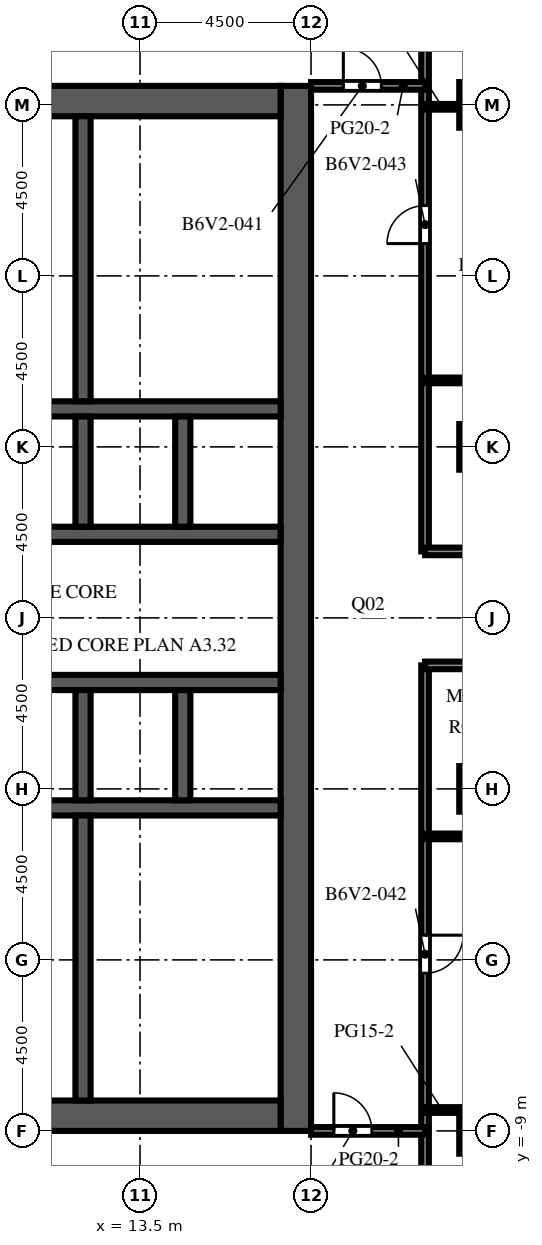
"""IFC4 building model, lengths in metres.
Left out: names, types, materials, properties, quantities, classifications, styles, units other than length and angle.
Written with IfcOpenShell. Run it as: python <this file> out.ifc"""

import sys

from ifc_helpers import new_model, si_unit, direction, frame, frame_2d, origin, origin_2d, place, context, subcontext, project, spatial, rectangle, extrude, element, fill, save


model = new_model("IFC4")
c1 = context("Model", 3, precision=1e-05, world=origin(), true_north=direction((0.0, 1.0)))
c2 = subcontext(c1, "Body", "Model", "MODEL_VIEW")
j1 = project(units=[si_unit("LENGTHUNIT", "METRE"), si_unit("PLANEANGLEUNIT", "RADIAN")], contexts=[c1])
p1 = place(None, origin())
s1 = spatial("IfcSite", under=j1, at=p1, CompositionType="ELEMENT")
p2 = place(p1, origin())
s2 = spatial("IfcBuilding", under=s1, at=p2, CompositionType="ELEMENT")
p3 = place(p2, frame((0.0, 0.0, 216.1)))
s3 = spatial("IfcBuildingStorey", under=s2, at=p3, CompositionType="ELEMENT", Elevation=216.1)
for number, where, z_axis, x_axis in (
    (1, (22.5, -9.0, 0.0), (0.0, 0.0, 1.0), (1.0, 0.0, 0.0)),
    (2, (22.5, 0.0, 0.0), (0.0, 0.0, 1.0), (1.0, 0.0, 0.0)),
    (3, (22.5, 9.0, 0.0), (0.0, 0.0, 1.0), (1.0, 0.0, 0.0)),
    (4, (22.5, 18.0, 0.0), (0.0, 0.0, 1.0), (1.0, 0.0, 0.0)),
):
    element("IfcColumn", number, at=place(p3, frame(where, z_axis=z_axis, x_axis=x_axis)), inside=s3, PredefinedType="COLUMN", context=c2, shape_type="SweptSolid", body=[
        extrude(rectangle(XDim=1.2, YDim=1.2, at=origin_2d()), origin(), (0.0, 0.0, 1.0), 4.1),
    ])
p4 = place(p3, frame((17.6, -9.0, 0.0), z_axis=(0.0, 0.0, 1.0), x_axis=(0.0, 1.0, 0.0)))
e5 = element("IfcWall", 5, at=p4, inside=s3, PredefinedType="SHEAR", context=c2, shape_type="SweptSolid", body=[
    extrude(rectangle(XDim=27.5, YDim=0.8, at=frame_2d((13.75, 0.0))), origin(), (0.0, 0.0, 1.0), 4.1),
])
p5 = place(p4, frame((12.55, 0.0, 0.0)))
e6 = element("IfcOpeningElement", 6, at=p5, cuts=e5, PredefinedType="OPENING", context=c2, shape_type="SweptSolid", body=[
    extrude(rectangle(XDim=2.4, YDim=2.4, at=frame_2d((1.2, 1.2))), frame((0.0, 0.41, 0.0), z_axis=(0.0, -1.0, 0.0), x_axis=(1.0, 0.0, 0.0)), (0.0, 0.0, 1.0), 0.82),
])
p6 = place(p4, frame((6.825, 0.0, 0.0)))
e7 = element("IfcOpeningElement", 7, at=p6, cuts=e5, PredefinedType="OPENING", context=c2, shape_type="SweptSolid", body=[
    extrude(rectangle(XDim=1.2, YDim=2.1, at=frame_2d((0.6, 1.05))), frame((0.0, 0.41, 0.0), z_axis=(0.0, -1.0, 0.0), x_axis=(1.0, 0.0, 0.0)), (0.0, 0.0, 1.0), 0.82),
])
p7 = place(p4, frame((19.475, 0.0, 0.0)))
e8 = element("IfcOpeningElement", 8, at=p7, cuts=e5, PredefinedType="OPENING", context=c2, shape_type="SweptSolid", body=[
    extrude(rectangle(XDim=1.2, YDim=2.1, at=frame_2d((0.6, 1.05))), frame((0.0, 0.41, 0.0), z_axis=(0.0, -1.0, 0.0), x_axis=(1.0, 0.0, 0.0)), (0.0, 0.0, 1.0), 0.82),
])
for number, where, z_axis, x_axis in (
    (9, (6.8, -8.6, 0.0), (0.0, 0.0, 1.0), (1.0, 0.0, 0.0)),
    (10, (6.8, 18.1, 0.0), (0.0, 0.0, 1.0), (1.0, 0.0, 0.0)),
):
    element("IfcWall", number, at=place(p3, frame(where, z_axis=z_axis, x_axis=x_axis)), inside=s3, PredefinedType="SHEAR", context=c2, shape_type="SweptSolid", body=[
        extrude(rectangle(XDim=10.4, YDim=0.8, at=frame_2d((5.2, 0.0))), origin(), (0.0, 0.0, 1.0), 4.1),
    ])
p8 = place(p3, frame((6.8, -0.5, 0.0), z_axis=(0.0, 0.0, 1.0), x_axis=(1.0, 0.0, 0.0)))
e11 = element("IfcWall", 11, at=p8, inside=s3, PredefinedType="SHEAR", context=c2, shape_type="SweptSolid", body=[
    extrude(rectangle(XDim=10.4, YDim=0.4, at=frame_2d((5.2, 0.0))), origin(), (0.0, 0.0, 1.0), 4.1),
])
p9 = place(p3, frame((6.8, 2.8, 0.0), z_axis=(0.0, 0.0, 1.0), x_axis=(1.0, 0.0, 0.0)))
e12 = element("IfcWall", 12, at=p9, inside=s3, PredefinedType="SHEAR", context=c2, shape_type="SweptSolid", body=[
    extrude(rectangle(XDim=10.4, YDim=0.4, at=frame_2d((5.2, 0.0))), origin(), (0.0, 0.0, 1.0), 4.1),
])
p10 = place(p9, frame((0.738, 0.0, 0.0)))
e13 = element("IfcOpeningElement", 13, at=p10, cuts=e12, PredefinedType="OPENING", context=c2, shape_type="SweptSolid", body=[
    extrude(rectangle(XDim=1.1, YDim=2.1, at=frame_2d((0.55, 1.05))), frame((0.0, 0.21, 0.0), z_axis=(0.0, -1.0, 0.0), x_axis=(1.0, 0.0, 0.0)), (0.0, 0.0, 1.0), 0.42),
])
p11 = place(p9, frame((3.337, 0.0, 0.0)))
e14 = element("IfcOpeningElement", 14, at=p11, cuts=e12, PredefinedType="OPENING", context=c2, shape_type="SweptSolid", body=[
    extrude(rectangle(XDim=1.1, YDim=2.1, at=frame_2d((0.55, 1.05))), frame((0.0, 0.21, 0.0), z_axis=(0.0, -1.0, 0.0), x_axis=(1.0, 0.0, 0.0)), (0.0, 0.0, 1.0), 0.42),
])
p12 = place(p9, frame((6.012, 0.0, 0.0)))
e15 = element("IfcOpeningElement", 15, at=p12, cuts=e12, PredefinedType="OPENING", context=c2, shape_type="SweptSolid", body=[
    extrude(rectangle(XDim=1.0, YDim=2.1, at=frame_2d((0.5, 1.05))), frame((0.0, 0.21, 0.0), z_axis=(0.0, -1.0, 0.0), x_axis=(1.0, 0.0, 0.0)), (0.0, 0.0, 1.0), 0.42),
])
p13 = place(p9, frame((8.613, 0.0, 0.0)))
e16 = element("IfcOpeningElement", 16, at=p13, cuts=e12, PredefinedType="OPENING", context=c2, shape_type="SweptSolid", body=[
    extrude(rectangle(XDim=1.0, YDim=2.1, at=frame_2d((0.5, 1.05))), frame((0.0, 0.21, 0.0), z_axis=(0.0, -1.0, 0.0), x_axis=(1.0, 0.0, 0.0)), (0.0, 0.0, 1.0), 0.42),
])
p14 = place(p3, frame((6.8, 6.7, 0.0), z_axis=(0.0, 0.0, 1.0), x_axis=(1.0, 0.0, 0.0)))
e17 = element("IfcWall", 17, at=p14, inside=s3, PredefinedType="SHEAR", context=c2, shape_type="SweptSolid", body=[
    extrude(rectangle(XDim=10.4, YDim=0.4, at=frame_2d((5.2, 0.0))), origin(), (0.0, 0.0, 1.0), 4.1),
])
p15 = place(p14, frame((3.337, 0.0, 0.0)))
e18 = element("IfcOpeningElement", 18, at=p15, cuts=e17, PredefinedType="OPENING", context=c2, shape_type="SweptSolid", body=[
    extrude(rectangle(XDim=1.1, YDim=2.1, at=frame_2d((0.55, 1.05))), frame((0.0, 0.21, 0.0), z_axis=(0.0, -1.0, 0.0), x_axis=(1.0, 0.0, 0.0)), (0.0, 0.0, 1.0), 0.42),
])
p16 = place(p14, frame((5.962, 0.0, 0.0)))
e19 = element("IfcOpeningElement", 19, at=p16, cuts=e17, PredefinedType="OPENING", context=c2, shape_type="SweptSolid", body=[
    extrude(rectangle(XDim=1.1, YDim=2.1, at=frame_2d((0.55, 1.05))), frame((0.0, 0.21, 0.0), z_axis=(0.0, -1.0, 0.0), x_axis=(1.0, 0.0, 0.0)), (0.0, 0.0, 1.0), 0.42),
])
p17 = place(p14, frame((8.663, 0.0, 0.0)))
e20 = element("IfcOpeningElement", 20, at=p17, cuts=e17, PredefinedType="OPENING", context=c2, shape_type="SweptSolid", body=[
    extrude(rectangle(XDim=1.1, YDim=2.1, at=frame_2d((0.55, 1.05))), frame((0.0, 0.21, 0.0), z_axis=(0.0, -1.0, 0.0), x_axis=(1.0, 0.0, 0.0)), (0.0, 0.0, 1.0), 0.42),
])
p18 = place(p14, frame((0.688, 0.0, 0.0)))
e21 = element("IfcOpeningElement", 21, at=p18, cuts=e17, PredefinedType="OPENING", context=c2, shape_type="SweptSolid", body=[
    extrude(rectangle(XDim=1.0, YDim=2.1, at=frame_2d((0.5, 1.05))), frame((0.0, 0.21, 0.0), z_axis=(0.0, -1.0, 0.0), x_axis=(1.0, 0.0, 0.0)), (0.0, 0.0, 1.0), 0.42),
])
p19 = place(p3, frame((6.8, 10.0, 0.0), z_axis=(0.0, 0.0, 1.0), x_axis=(1.0, 0.0, 0.0)))
e22 = element("IfcWall", 22, at=p19, inside=s3, PredefinedType="SHEAR", context=c2, shape_type="SweptSolid", body=[
    extrude(rectangle(XDim=10.4, YDim=0.4, at=frame_2d((5.2, 0.0))), origin(), (0.0, 0.0, 1.0), 4.1),
])
for number, where, z_axis, x_axis in (
    (23, (12.0, -0.3, 0.0), (0.0, 0.0, 1.0), (0.0, 1.0, 0.0)),
    (24, (12.0, 6.9, 0.0), (0.0, 0.0, 1.0), (0.0, 1.0, 0.0)),
    (25, (14.625, -0.3, 0.0), (0.0, 0.0, 1.0), (0.0, 1.0, 0.0)),
    (26, (14.625, 6.9, 0.0), (0.0, 0.0, 1.0), (0.0, 1.0, 0.0)),
):
    element("IfcWall", number, at=place(p3, frame(where, z_axis=z_axis, x_axis=x_axis)), inside=s3, PredefinedType="SHEAR", context=c2, shape_type="SweptSolid", body=[
        extrude(rectangle(XDim=2.9, YDim=0.4, at=frame_2d((1.45, 0.0))), origin(), (0.0, 0.0, 1.0), 4.1),
    ])
for number, where, z_axis, x_axis in (
    (27, (12.0, -8.2, 0.0), (0.0, 0.0, 1.0), (0.0, 1.0, 0.0)),
    (28, (12.0, 10.2, 0.0), (0.0, 0.0, 1.0), (0.0, 1.0, 0.0)),
):
    element("IfcWall", number, at=place(p3, frame(where, z_axis=z_axis, x_axis=x_axis)), inside=s3, PredefinedType="SHEAR", context=c2, shape_type="SweptSolid", body=[
        extrude(rectangle(XDim=7.5, YDim=0.4, at=frame_2d((3.75, 0.0))), origin(), (0.0, 0.0, 1.0), 4.1),
    ])
p20 = place(p3, frame((9.3, -3.7, 0.0), z_axis=(0.0, 0.0, 1.0), x_axis=(1.0, 0.0, 0.0)))
e29 = element("IfcWall", 29, at=p20, inside=s3, PredefinedType="PARTITIONING", context=c2, shape_type="SweptSolid", body=[
    extrude(rectangle(XDim=2.5, YDim=0.1, at=frame_2d((1.25, 0.0))), origin(), (0.0, 0.0, 1.0), 3.5),
])
p21 = place(p20, frame((0.75, 0.0, 0.0)))
e30 = element("IfcOpeningElement", 30, at=p21, cuts=e29, PredefinedType="OPENING", context=c2, shape_type="SweptSolid", body=[
    extrude(rectangle(XDim=1.0, YDim=2.1, at=frame_2d((0.5, 1.05))), frame((0.0, 0.06, 0.0), z_axis=(0.0, -1.0, 0.0), x_axis=(1.0, 0.0, 0.0)), (0.0, 0.0, 1.0), 0.12),
])
p22 = place(p3, frame((9.3, -2.35, 0.0), z_axis=(0.0, 0.0, 1.0), x_axis=(1.0, 0.0, 0.0)))
e31 = element("IfcWall", 31, at=p22, inside=s3, PredefinedType="PARTITIONING", context=c2, shape_type="SweptSolid", body=[
    extrude(rectangle(XDim=2.5, YDim=0.1, at=frame_2d((1.25, 0.0))), origin(), (0.0, 0.0, 1.0), 3.5),
])
p23 = place(p22, frame((0.75, 0.0, 0.0)))
e32 = element("IfcOpeningElement", 32, at=p23, cuts=e31, PredefinedType="OPENING", context=c2, shape_type="SweptSolid", body=[
    extrude(rectangle(XDim=1.0, YDim=2.1, at=frame_2d((0.5, 1.05))), frame((0.0, 0.06, 0.0), z_axis=(0.0, -1.0, 0.0), x_axis=(1.0, 0.0, 0.0)), (0.0, 0.0, 1.0), 0.12),
])
for number, where, z_axis, x_axis in (
    (33, (8.1, 12.45, 0.0), (0.0, 0.0, 1.0), (1.0, 0.0, 0.0)),
    (34, (8.1, 15.075, 0.0), (0.0, 0.0, 1.0), (1.0, 0.0, 0.0)),
):
    element("IfcWall", number, at=place(p3, frame(where, z_axis=z_axis, x_axis=x_axis)), inside=s3, PredefinedType="PARTITIONING", context=c2, shape_type="SweptSolid", body=[
        extrude(rectangle(XDim=3.7, YDim=0.1, at=frame_2d((1.85, 0.0))), origin(), (0.0, 0.0, 1.0), 3.5),
    ])
p24 = place(p3, frame((21.0, 3.25, 0.0), z_axis=(0.0, 0.0, 1.0), x_axis=(0.0, -1.0, 0.0)))
e35 = element("IfcWall", 35, at=p24, inside=s3, PredefinedType="PARTITIONING", context=c2, shape_type="SweptSolid", body=[
    extrude(rectangle(XDim=30.1, YDim=0.2, at=frame_2d((15.05, 0.0))), origin(), (0.0, 0.0, 1.0), 3.5),
])
p25 = place(p24, frame((7.1, 0.0, 0.0)))
e36 = element("IfcOpeningElement", 36, at=p25, cuts=e35, PredefinedType="OPENING", context=c2, shape_type="SweptSolid", body=[
    extrude(rectangle(XDim=1.0, YDim=2.1, at=frame_2d((0.5, 1.05))), frame((0.0, 0.11, 0.0), z_axis=(0.0, -1.0, 0.0), x_axis=(1.0, 0.0, 0.0)), (0.0, 0.0, 1.0), 0.22),
])
p26 = place(p3, frame((21.0, 26.85, 0.0), z_axis=(0.0, 0.0, 1.0), x_axis=(0.0, -1.0, 0.0)))
e37 = element("IfcWall", 37, at=p26, inside=s3, PredefinedType="PARTITIONING", context=c2, shape_type="SweptSolid", body=[
    extrude(rectangle(XDim=20.6, YDim=0.2, at=frame_2d((10.3, 0.0))), origin(), (0.0, 0.0, 1.0), 3.5),
])
p27 = place(p26, frame((11.5, 0.0, 0.0)))
e38 = element("IfcOpeningElement", 38, at=p27, cuts=e37, PredefinedType="OPENING", context=c2, shape_type="SweptSolid", body=[
    extrude(rectangle(XDim=1.0, YDim=2.1, at=frame_2d((0.5, 1.05))), frame((0.0, 0.11, 0.0), z_axis=(0.0, -1.0, 0.0), x_axis=(1.0, 0.0, 0.0)), (0.0, 0.0, 1.0), 0.22),
])
p28 = place(p3, frame((21.0, -9.0, 0.0), z_axis=(0.0, 0.0, 1.0), x_axis=(-1.0, 0.0, 0.0)))
e39 = element("IfcWall", 39, at=p28, inside=s3, PredefinedType="PARTITIONING", context=c2, shape_type="SweptSolid", body=[
    extrude(rectangle(XDim=3.0, YDim=0.2, at=frame_2d((1.5, 0.0))), origin(), (0.0, 0.0, 1.0), 3.5),
])
p29 = place(p28, frame((1.4, 0.0, 0.0)))
e40 = element("IfcOpeningElement", 40, at=p29, cuts=e39, PredefinedType="OPENING", context=c2, shape_type="SweptSolid", body=[
    extrude(rectangle(XDim=1.0, YDim=2.1, at=frame_2d((0.5, 1.05))), frame((0.0, 0.11, 0.0), z_axis=(0.0, -1.0, 0.0), x_axis=(1.0, 0.0, 0.0)), (0.0, 0.0, 1.0), 0.22),
])
p30 = place(p3, frame((21.0, -8.45, 0.0), z_axis=(0.0, 0.0, 1.0), x_axis=(1.0, 0.0, 0.0)))
e41 = element("IfcWall", 41, at=p30, inside=s3, PredefinedType="PARTITIONING", context=c2, shape_type="SweptSolid", body=[
    extrude(rectangle(XDim=0.9, YDim=0.15, at=frame_2d((0.45, 0.0))), origin(), (0.0, 0.0, 1.0), 3.5),
])
p31 = place(p3, frame((21.0, -1.25, 0.0), z_axis=(0.0, 0.0, 1.0), x_axis=(1.0, 0.0, 0.0)))
e42 = element("IfcWall", 42, at=p31, inside=s3, PredefinedType="PARTITIONING", context=c2, shape_type="SweptSolid", body=[
    extrude(rectangle(XDim=10.35, YDim=0.15, at=frame_2d((5.175, 0.0))), origin(), (0.0, 0.0, 1.0), 3.5),
])
p32 = place(p31, frame((2.35, 0.0, 0.0)))
e43 = element("IfcOpeningElement", 43, at=p32, cuts=e42, PredefinedType="OPENING", context=c2, shape_type="SweptSolid", body=[
    extrude(rectangle(XDim=1.0, YDim=2.1, at=frame_2d((0.5, 1.05))), frame((0.0, 0.085, 0.0), z_axis=(0.0, -1.0, 0.0), x_axis=(1.0, 0.0, 0.0)), (0.0, 0.0, 1.0), 0.17),
])
p33 = place(p31, frame((7.1, 0.0, 0.0)))
e44 = element("IfcOpeningElement", 44, at=p33, cuts=e42, PredefinedType="OPENING", context=c2, shape_type="SweptSolid", body=[
    extrude(rectangle(XDim=1.0, YDim=2.1, at=frame_2d((0.5, 1.05))), frame((0.0, 0.085, 0.0), z_axis=(0.0, -1.0, 0.0), x_axis=(1.0, 0.0, 0.0)), (0.0, 0.0, 1.0), 0.17),
])
p34 = place(p3, frame((31.35, 3.25, 0.0), z_axis=(0.0, 0.0, 1.0), x_axis=(-1.0, 0.0, 0.0)))
e45 = element("IfcWall", 45, at=p34, inside=s3, PredefinedType="PARTITIONING", context=c2, shape_type="SweptSolid", body=[
    extrude(rectangle(XDim=10.35, YDim=0.2, at=frame_2d((5.175, 0.0))), origin(), (0.0, 0.0, 1.0), 3.5),
])
p35 = place(p34, frame((1.0, 0.0, 0.0)))
e46 = element("IfcOpeningElement", 46, at=p35, cuts=e45, PredefinedType="OPENING", context=c2, shape_type="SweptSolid", body=[
    extrude(rectangle(XDim=1.0, YDim=2.1, at=frame_2d((0.5, 1.05))), frame((0.0, 0.11, 0.0), z_axis=(0.0, -1.0, 0.0), x_axis=(1.0, 0.0, 0.0)), (0.0, 0.0, 1.0), 0.22),
])
p36 = place(p3, frame((21.0, 6.25, 0.0), z_axis=(0.0, 0.0, 1.0), x_axis=(1.0, 0.0, 0.0)))
e47 = element("IfcWall", 47, at=p36, inside=s3, PredefinedType="PARTITIONING", context=c2, shape_type="SweptSolid", body=[
    extrude(rectangle(XDim=10.35, YDim=0.2, at=frame_2d((5.175, 0.0))), origin(), (0.0, 0.0, 1.0), 3.5),
])
p37 = place(p36, frame((8.1, 0.0, 0.0)))
e48 = element("IfcOpeningElement", 48, at=p37, cuts=e47, PredefinedType="OPENING", context=c2, shape_type="SweptSolid", body=[
    extrude(rectangle(XDim=1.0, YDim=2.1, at=frame_2d((0.5, 1.05))), frame((0.0, 0.11, 0.0), z_axis=(0.0, -1.0, 0.0), x_axis=(1.0, 0.0, 0.0)), (0.0, 0.0, 1.0), 0.22),
])
p38 = place(p3, frame((31.35, 10.75, 0.0), z_axis=(0.0, 0.0, 1.0), x_axis=(-1.0, 0.0, 0.0)))
e49 = element("IfcWall", 49, at=p38, inside=s3, PredefinedType="PARTITIONING", context=c2, shape_type="SweptSolid", body=[
    extrude(rectangle(XDim=10.35, YDim=0.15, at=frame_2d((5.175, 0.0))), origin(), (0.0, 0.0, 1.0), 3.5),
])
p39 = place(p38, frame((6.75, 0.0, 0.0)))
e50 = element("IfcOpeningElement", 50, at=p39, cuts=e49, PredefinedType="OPENING", context=c2, shape_type="SweptSolid", body=[
    extrude(rectangle(XDim=1.0, YDim=2.1, at=frame_2d((0.5, 1.05))), frame((0.0, 0.085, 0.0), z_axis=(0.0, -1.0, 0.0), x_axis=(1.0, 0.0, 0.0)), (0.0, 0.0, 1.0), 0.17),
])
p40 = place(p38, frame((1.5, 0.0, 0.0)))
e51 = element("IfcOpeningElement", 51, at=p40, cuts=e49, PredefinedType="OPENING", context=c2, shape_type="SweptSolid", body=[
    extrude(rectangle(XDim=1.0, YDim=2.1, at=frame_2d((0.5, 1.05))), frame((0.0, 0.085, 0.0), z_axis=(0.0, -1.0, 0.0), x_axis=(1.0, 0.0, 0.0)), (0.0, 0.0, 1.0), 0.17),
])
p41 = place(p3, frame((21.0, 17.95, 0.0), z_axis=(0.0, 0.0, 1.0), x_axis=(1.0, 0.0, 0.0)))
e52 = element("IfcWall", 52, at=p41, inside=s3, PredefinedType="PARTITIONING", context=c2, shape_type="SweptSolid", body=[
    extrude(rectangle(XDim=0.9, YDim=0.15, at=frame_2d((0.45, 0.0))), origin(), (0.0, 0.0, 1.0), 3.5),
])
p42 = place(p3, frame((18.0, 18.5, 0.0), z_axis=(0.0, 0.0, 1.0), x_axis=(1.0, 0.0, 0.0)))
e53 = element("IfcWall", 53, at=p42, inside=s3, PredefinedType="PARTITIONING", context=c2, shape_type="SweptSolid", body=[
    extrude(rectangle(XDim=3.0, YDim=0.2, at=frame_2d((1.5, 0.0))), origin(), (0.0, 0.0, 1.0), 3.5),
])
p43 = place(p42, frame((0.85, 0.0, 0.0)))
e54 = element("IfcOpeningElement", 54, at=p43, cuts=e53, PredefinedType="OPENING", context=c2, shape_type="SweptSolid", body=[
    extrude(rectangle(XDim=1.0, YDim=2.1, at=frame_2d((0.5, 1.05))), frame((0.0, 0.11, 0.0), z_axis=(0.0, -1.0, 0.0), x_axis=(1.0, 0.0, 0.0)), (0.0, 0.0, 1.0), 0.22),
])
p44 = place(p11, origin())
e55 = element("IfcDoor", 55, at=p44, inside=s3, OperationType="DOUBLE_DOOR_SLIDING", PredefinedType="DOOR", context=c2, shape_type="SweptSolid", body=[
    extrude(rectangle(XDim=1.1, YDim=2.1, at=frame_2d((0.55, 1.05))), frame((0.0, 0.025, 0.0), z_axis=(0.0, -1.0, 0.0), x_axis=(1.0, 0.0, 0.0)), (0.0, 0.0, 1.0), 0.05),
])
fill(e14, e55)
p45 = place(p15, origin())
e56 = element("IfcDoor", 56, at=p45, inside=s3, OperationType="DOUBLE_DOOR_SLIDING", PredefinedType="DOOR", context=c2, shape_type="SweptSolid", body=[
    extrude(rectangle(XDim=1.1, YDim=2.1, at=frame_2d((0.55, 1.05))), frame((0.0, 0.025, 0.0), z_axis=(0.0, -1.0, 0.0), x_axis=(1.0, 0.0, 0.0)), (0.0, 0.0, 1.0), 0.05),
])
fill(e18, e56)
p46 = place(p16, origin())
e57 = element("IfcDoor", 57, at=p46, inside=s3, OperationType="DOUBLE_DOOR_SLIDING", PredefinedType="DOOR", context=c2, shape_type="SweptSolid", body=[
    extrude(rectangle(XDim=1.1, YDim=2.1, at=frame_2d((0.55, 1.05))), frame((0.0, 0.025, 0.0), z_axis=(0.0, -1.0, 0.0), x_axis=(1.0, 0.0, 0.0)), (0.0, 0.0, 1.0), 0.05),
])
fill(e19, e57)
p47 = place(p17, origin())
e58 = element("IfcDoor", 58, at=p47, inside=s3, OperationType="DOUBLE_DOOR_SLIDING", PredefinedType="DOOR", context=c2, shape_type="SweptSolid", body=[
    extrude(rectangle(XDim=1.1, YDim=2.1, at=frame_2d((0.55, 1.05))), frame((0.0, 0.025, 0.0), z_axis=(0.0, -1.0, 0.0), x_axis=(1.0, 0.0, 0.0)), (0.0, 0.0, 1.0), 0.05),
])
fill(e20, e58)
p48 = place(p5, origin())
e59 = element("IfcDoor", 59, at=p48, inside=s3, OperationType="DOUBLE_DOOR_DOUBLE_SWING", PredefinedType="DOOR", context=c2, shape_type="SweptSolid", body=[
    extrude(rectangle(XDim=2.4, YDim=2.4, at=frame_2d((1.2, 1.2))), frame((0.0, 0.025, 0.0), z_axis=(0.0, -1.0, 0.0), x_axis=(1.0, 0.0, 0.0)), (0.0, 0.0, 1.0), 0.05),
])
fill(e6, e59)
p49 = place(p6, frame((1.2, 0.0, 0.0), z_axis=(0.0, 0.0, 1.0), x_axis=(-1.0, 0.0, 0.0)))
e60 = element("IfcDoor", 60, at=p49, inside=s3, OperationType="SINGLE_SWING_LEFT", PredefinedType="DOOR", context=c2, shape_type="SweptSolid", body=[
    extrude(rectangle(XDim=1.2, YDim=2.1, at=frame_2d((0.6, 1.05))), frame((0.0, 0.025, 0.0), z_axis=(0.0, -1.0, 0.0), x_axis=(1.0, 0.0, 0.0)), (0.0, 0.0, 1.0), 0.05),
])
fill(e7, e60)
p50 = place(p7, frame((1.2, 0.0, 0.0), z_axis=(0.0, 0.0, 1.0), x_axis=(-1.0, 0.0, 0.0)))
e61 = element("IfcDoor", 61, at=p50, inside=s3, OperationType="SINGLE_SWING_LEFT", PredefinedType="DOOR", context=c2, shape_type="SweptSolid", body=[
    extrude(rectangle(XDim=1.2, YDim=2.1, at=frame_2d((0.6, 1.05))), frame((0.0, 0.025, 0.0), z_axis=(0.0, -1.0, 0.0), x_axis=(1.0, 0.0, 0.0)), (0.0, 0.0, 1.0), 0.05),
])
fill(e8, e61)
p51 = place(p12, origin())
e62 = element("IfcDoor", 62, at=p51, inside=s3, OperationType="SINGLE_SWING_LEFT", PredefinedType="DOOR", context=c2, shape_type="SweptSolid", body=[
    extrude(rectangle(XDim=1.0, YDim=2.1, at=frame_2d((0.5, 1.05))), frame((0.0, 0.025, 0.0), z_axis=(0.0, -1.0, 0.0), x_axis=(1.0, 0.0, 0.0)), (0.0, 0.0, 1.0), 0.05),
])
fill(e15, e62)
p52 = place(p13, origin())
e63 = element("IfcDoor", 63, at=p52, inside=s3, OperationType="SINGLE_SWING_RIGHT", PredefinedType="DOOR", context=c2, shape_type="SweptSolid", body=[
    extrude(rectangle(XDim=1.0, YDim=2.1, at=frame_2d((0.5, 1.05))), frame((0.0, 0.025, 0.0), z_axis=(0.0, -1.0, 0.0), x_axis=(1.0, 0.0, 0.0)), (0.0, 0.0, 1.0), 0.05),
])
fill(e16, e63)
p53 = place(p29, origin())
e64 = element("IfcDoor", 64, at=p53, inside=s3, OperationType="SINGLE_SWING_RIGHT", PredefinedType="DOOR", context=c2, shape_type="SweptSolid", body=[
    extrude(rectangle(XDim=1.0, YDim=2.1, at=frame_2d((0.5, 1.05))), frame((0.0, 0.025, 0.0), z_axis=(0.0, -1.0, 0.0), x_axis=(1.0, 0.0, 0.0)), (0.0, 0.0, 1.0), 0.05),
])
fill(e40, e64)
p54 = place(p43, origin())
e65 = element("IfcDoor", 65, at=p54, inside=s3, OperationType="SINGLE_SWING_LEFT", PredefinedType="DOOR", context=c2, shape_type="SweptSolid", body=[
    extrude(rectangle(XDim=1.0, YDim=2.1, at=frame_2d((0.5, 1.05))), frame((0.0, 0.025, 0.0), z_axis=(0.0, -1.0, 0.0), x_axis=(1.0, 0.0, 0.0)), (0.0, 0.0, 1.0), 0.05),
])
fill(e54, e65)
p55 = place(p25, origin())
e66 = element("IfcDoor", 66, at=p55, inside=s3, OperationType="SINGLE_SWING_LEFT", PredefinedType="DOOR", context=c2, shape_type="SweptSolid", body=[
    extrude(rectangle(XDim=1.0, YDim=2.1, at=frame_2d((0.5, 1.05))), frame((0.0, 0.025, 0.0), z_axis=(0.0, -1.0, 0.0), x_axis=(1.0, 0.0, 0.0)), (0.0, 0.0, 1.0), 0.05),
])
fill(e36, e66)
p56 = place(p27, origin())
e67 = element("IfcDoor", 67, at=p56, inside=s3, OperationType="SINGLE_SWING_RIGHT", PredefinedType="DOOR", context=c2, shape_type="SweptSolid", body=[
    extrude(rectangle(XDim=1.0, YDim=2.1, at=frame_2d((0.5, 1.05))), frame((0.0, 0.025, 0.0), z_axis=(0.0, -1.0, 0.0), x_axis=(1.0, 0.0, 0.0)), (0.0, 0.0, 1.0), 0.05),
])
fill(e38, e67)
save(model, sys.argv[1])
